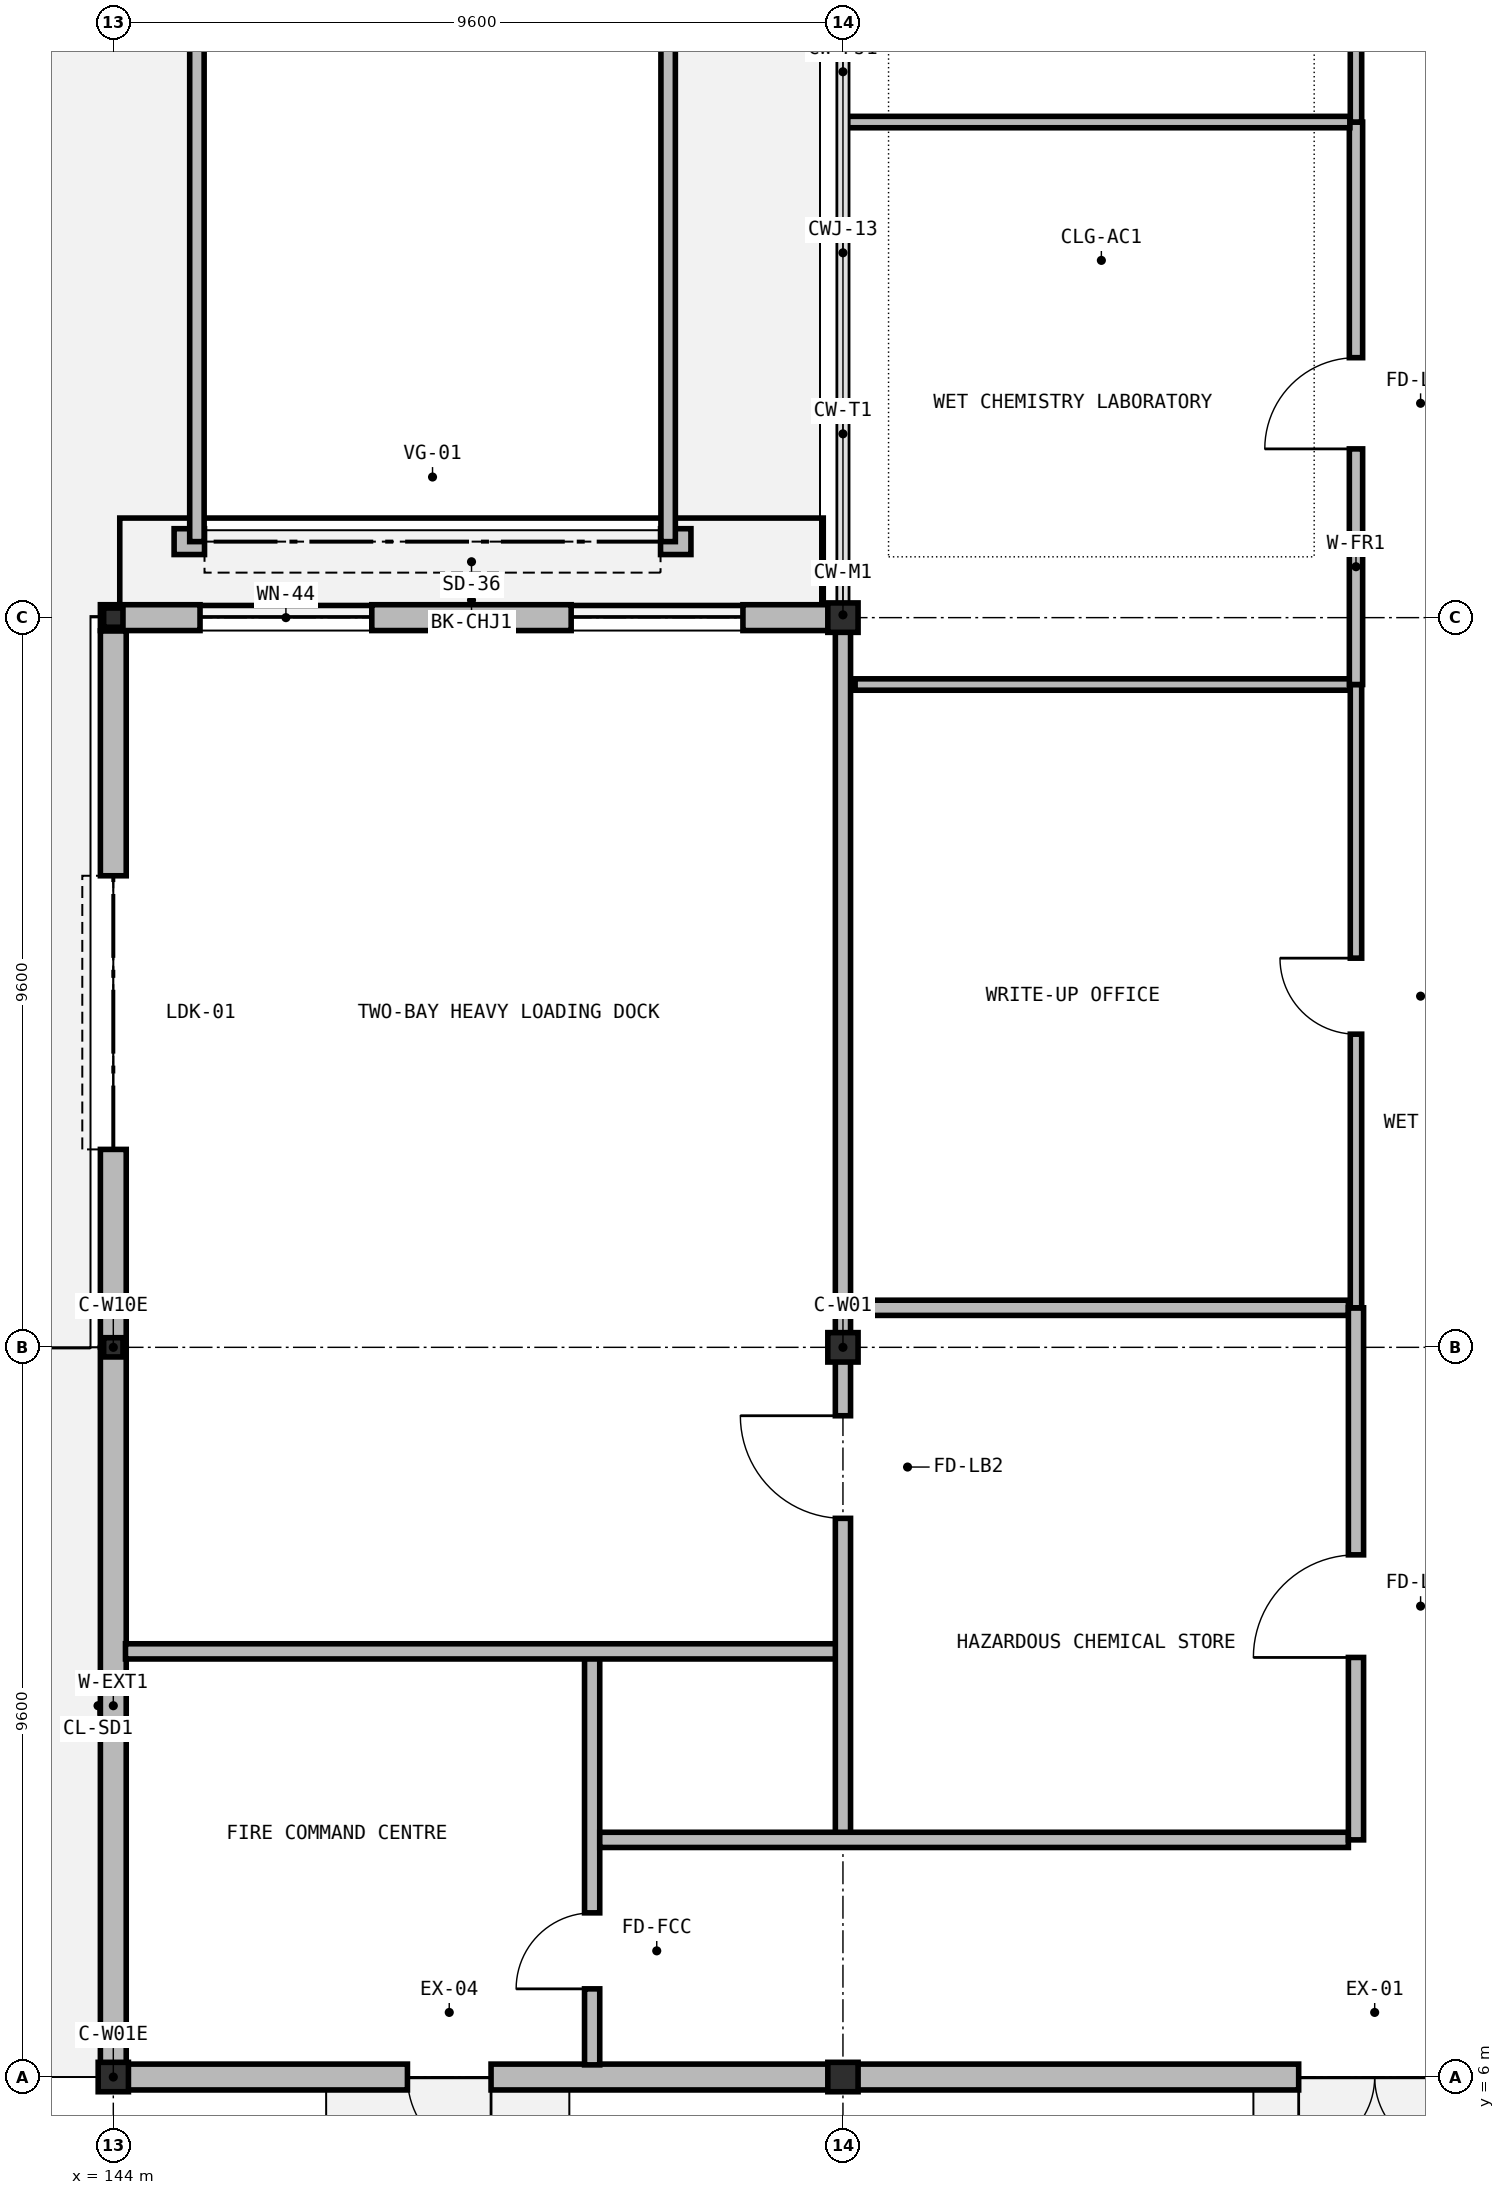
"""IFC4 building model, lengths in metres.
Left out: names, types, materials, properties, quantities, classifications, styles, units other than length and angle.
Written with IfcOpenShell. Run it as: python <this file> out.ifc"""

import sys

from ifc_helpers import new_model, si_unit, direction, frame, frame_2d, origin, origin_2d, place, context, subcontext, project, spatial, rectangle, i_section, extrude, element, fill, save


model = new_model("IFC4")
c1 = context("Model", 3, precision=1e-05, world=origin(), true_north=direction((0.0, 1.0)))
c2 = subcontext(c1, "Body", "Model", "MODEL_VIEW")
j1 = project(units=[si_unit("LENGTHUNIT", "METRE"), si_unit("PLANEANGLEUNIT", "RADIAN")], contexts=[c1])
p1 = place(None, origin())
s1 = spatial("IfcSite", under=j1, at=p1, CompositionType="ELEMENT")
p2 = place(p1, origin())
s2 = spatial("IfcBuilding", under=s1, at=p2, CompositionType="ELEMENT")
p3 = place(p2, origin())
s3 = spatial("IfcBuildingStorey", under=s2, at=p3, CompositionType="ELEMENT", Elevation=0.0)
for number, where, z_axis, x_axis in (
    (1, (144.0, 15.6, 0.0), (0.0, 0.0, 1.0), (1.0, 0.0, 0.0)),
    (2, (144.0, 25.2, 0.0), (0.0, 0.0, 1.0), (1.0, 0.0, 0.0)),
):
    element("IfcColumn", number, at=place(p3, frame(where, z_axis=z_axis, x_axis=x_axis)), inside=s3, PredefinedType="COLUMN", context=c2, shape_type="SweptSolid", body=[
        extrude(i_section(OverallWidth=0.254, OverallDepth=0.253, WebThickness=0.009, FlangeThickness=0.014, at=origin_2d()), origin(), (0.0, 0.0, 1.0), 5.25),
    ])
for number, where, z_axis, x_axis in (
    (3, (144.0, 6.0, 0.0), (0.0, 0.0, 1.0), (1.0, 0.0, 0.0)),
    (4, (153.6, 6.0, 0.0), (0.0, 0.0, 1.0), (1.0, 0.0, 0.0)),
    (5, (153.6, 15.6, 0.0), (0.0, 0.0, 1.0), (1.0, 0.0, 0.0)),
    (6, (153.6, 25.2, 0.0), (0.0, 0.0, 1.0), (1.0, 0.0, 0.0)),
):
    element("IfcColumn", number, at=place(p3, frame(where, z_axis=z_axis, x_axis=x_axis)), inside=s3, PredefinedType="COLUMN", context=c2, shape_type="SweptSolid", body=[
        extrude(i_section(OverallWidth=0.398, OverallDepth=0.387, WebThickness=0.024, FlangeThickness=0.039, at=origin_2d()), origin(), (0.0, 0.0, 1.0), 5.25),
    ])
p4 = place(p3, frame((144.0, 6.174, 0.0), z_axis=(0.0, 0.0, 1.0), x_axis=(0.0, 1.0, 0.0)))
e7 = element("IfcWall", 7, at=p4, inside=s3, PredefinedType="SOLIDWALL", context=c2, shape_type="SweptSolid", body=[
    extrude(rectangle(XDim=9.422, YDim=0.34, at=frame_2d((4.711, 0.0))), origin(), (0.0, 0.0, 1.0), 4.537),
])
p5 = place(p3, frame((144.0, 15.604, 0.0), z_axis=(0.0, 0.0, 1.0), x_axis=(0.0, 1.0, 0.0)))
e8 = element("IfcWall", 8, at=p5, inside=s3, PredefinedType="SOLIDWALL", context=c2, shape_type="SweptSolid", body=[
    extrude(rectangle(XDim=9.422, YDim=0.34, at=frame_2d((4.711, 0.0))), origin(), (0.0, 0.0, 1.0), 4.537),
])
p6 = place(p5, frame((2.6, 0.0, 0.0)))
e9 = element("IfcOpeningElement", 9, at=p6, cuts=e8, PredefinedType="OPENING", context=c2, shape_type="SweptSolid", body=[
    extrude(rectangle(XDim=3.6, YDim=4.2, at=frame_2d((1.8, 2.1))), frame((0.0, 0.18, 0.0), z_axis=(0.0, -1.0, 0.0), x_axis=(1.0, 0.0, 0.0)), (0.0, 0.0, 1.0), 0.36),
])
p7 = place(p3, frame((143.83, 25.2, 0.0), z_axis=(0.0, 0.0, 1.0), x_axis=(1.0, 0.0, 0.0)))
e10 = element("IfcWall", 10, at=p7, inside=s3, PredefinedType="SOLIDWALL", context=c2, shape_type="SweptSolid", body=[
    extrude(rectangle(XDim=9.766, YDim=0.34, at=frame_2d((4.883, 0.0))), origin(), (0.0, 0.0, 1.0), 4.465),
])
p8 = place(p7, frame((1.311, 0.0, 0.95)))
e11 = element("IfcOpeningElement", 11, at=p8, cuts=e10, PredefinedType="OPENING", context=c2, shape_type="SweptSolid", body=[
    extrude(rectangle(XDim=2.26, YDim=1.52, at=frame_2d((1.13, 0.76))), frame((0.0, 0.18, 0.0), z_axis=(0.0, -1.0, 0.0), x_axis=(1.0, 0.0, 0.0)), (0.0, 0.0, 1.0), 0.36),
])
p9 = place(p7, frame((6.194, 0.0, 0.95)))
e12 = element("IfcOpeningElement", 12, at=p9, cuts=e10, PredefinedType="OPENING", context=c2, shape_type="SweptSolid", body=[
    extrude(rectangle(XDim=2.26, YDim=1.52, at=frame_2d((1.13, 0.76))), frame((0.0, 0.18, 0.0), z_axis=(0.0, -1.0, 0.0), x_axis=(1.0, 0.0, 0.0)), (0.0, 0.0, 1.0), 0.36),
])
p10 = place(p3, frame((153.77, 6.0, 0.0), z_axis=(0.0, 0.0, 1.0), x_axis=(-1.0, 0.0, 0.0)))
e13 = element("IfcWall", 13, at=p10, inside=s3, PredefinedType="SOLIDWALL", context=c2, shape_type="SweptSolid", body=[
    extrude(rectangle(XDim=9.94, YDim=0.34, at=frame_2d((4.97, 0.0))), origin(), (0.0, 0.0, 1.0), 4.537),
])
p11 = place(p10, frame((4.8, 0.0, 0.0)))
e14 = element("IfcOpeningElement", 14, at=p11, cuts=e13, PredefinedType="OPENING", context=c2, shape_type="SweptSolid", body=[
    extrude(rectangle(XDim=1.1, YDim=2.15, at=frame_2d((0.55, 1.075))), frame((0.0, 0.18, 0.0), z_axis=(0.0, -1.0, 0.0), x_axis=(1.0, 0.0, 0.0)), (0.0, 0.0, 1.0), 0.36),
])
p12 = place(p3, frame((163.196, 6.0, 0.0), z_axis=(0.0, 0.0, 1.0), x_axis=(-1.0, 0.0, 0.0)))
e15 = element("IfcWall", 15, at=p12, inside=s3, PredefinedType="SOLIDWALL", context=c2, shape_type="SweptSolid", body=[
    extrude(rectangle(XDim=9.766, YDim=0.34, at=frame_2d((4.883, 0.0))), origin(), (0.0, 0.0, 1.0), 4.584),
])
p13 = place(p12, frame((1.6, 0.0, 0.0)))
e16 = element("IfcOpeningElement", 16, at=p13, cuts=e15, PredefinedType="OPENING", context=c2, shape_type="SweptSolid", body=[
    extrude(rectangle(XDim=2.0, YDim=2.3, at=frame_2d((1.0, 1.15))), frame((0.0, 0.18, 0.0), z_axis=(0.0, -1.0, 0.0), x_axis=(1.0, 0.0, 0.0)), (0.0, 0.0, 1.0), 0.36),
])
p14 = place(p3, frame((151.6, 26.2, 0.0), z_axis=(0.0, 0.0, 1.0), x_axis=(-1.0, 0.0, 0.0)))
e17 = element("IfcWall", 17, at=p14, inside=s3, PredefinedType="SOLIDWALL", context=c2, shape_type="SweptSolid", body=[
    extrude(rectangle(XDim=6.8, YDim=0.34, at=frame_2d((3.4, 0.0))), origin(), (0.0, 0.0, 1.0), 5.05),
])
p15 = place(p14, frame((0.4, 0.0, 0.0)))
e18 = element("IfcOpeningElement", 18, at=p15, cuts=e17, PredefinedType="OPENING", context=c2, shape_type="SweptSolid", body=[
    extrude(rectangle(XDim=6.0, YDim=4.5, at=frame_2d((3.0, 2.25))), frame((0.0, 0.18, 0.0), z_axis=(0.0, -1.0, 0.0), x_axis=(1.0, 0.0, 0.0)), (0.0, 0.0, 1.0), 0.36),
])
for number, where, z_axis, x_axis in (
    (19, (145.1, 26.2, 0.0), (0.0, 0.0, 1.0), (0.0, 1.0, 0.0)),
    (20, (151.3, 56.1, 0.0), (0.0, 0.0, 1.0), (0.0, -1.0, 0.0)),
):
    element("IfcWall", number, at=place(p3, frame(where, z_axis=z_axis, x_axis=x_axis)), inside=s3, PredefinedType="PARAPET", context=c2, shape_type="SweptSolid", body=[
        extrude(rectangle(XDim=29.9, YDim=0.19, at=frame_2d((14.95, 0.0))), origin(), (0.0, 0.0, 1.0), 1.3),
    ])
p16 = place(p3, frame((150.3, 6.16, 0.0), z_axis=(0.0, 0.0, 1.0), x_axis=(0.0, 1.0, 0.0)))
e21 = element("IfcWall", 21, at=p16, inside=s3, PredefinedType="SOLIDWALL", context=c2, shape_type="SweptSolid", body=[
    extrude(rectangle(XDim=5.44, YDim=0.2, at=frame_2d((2.72, 0.0))), origin(), (0.0, 0.0, 1.0), 4.93),
])
p17 = place(p16, frame((1.0, 0.0, 0.0)))
e22 = element("IfcOpeningElement", 22, at=p17, cuts=e21, PredefinedType="OPENING", context=c2, shape_type="SweptSolid", body=[
    extrude(rectangle(XDim=1.0, YDim=2.15, at=frame_2d((0.5, 1.075))), frame((0.0, 0.11, 0.0), z_axis=(0.0, -1.0, 0.0), x_axis=(1.0, 0.0, 0.0)), (0.0, 0.0, 1.0), 0.22),
])
p18 = place(p3, frame((144.16, 11.6, 0.0), z_axis=(0.0, 0.0, 1.0), x_axis=(1.0, 0.0, 0.0)))
e23 = element("IfcWall", 23, at=p18, inside=s3, PredefinedType="SOLIDWALL", context=c2, shape_type="SweptSolid", body=[
    extrude(rectangle(XDim=9.49, YDim=0.2, at=frame_2d((4.745, 0.0))), origin(), (0.0, 0.0, 1.0), 4.93),
])
p19 = place(p3, frame((153.6, 9.15, 0.0), z_axis=(0.0, 0.0, 1.0), x_axis=(0.0, 1.0, 0.0)))
e24 = element("IfcWall", 24, at=p19, inside=s3, PredefinedType="SOLIDWALL", context=c2, shape_type="SweptSolid", body=[
    extrude(rectangle(XDim=15.89, YDim=0.2, at=frame_2d((7.945, 0.0))), origin(), (0.0, 0.0, 1.0), 4.551),
])
p20 = place(p19, frame((4.2, 0.0, 0.0)))
e25 = element("IfcOpeningElement", 25, at=p20, cuts=e24, PredefinedType="OPENING", context=c2, shape_type="SweptSolid", body=[
    extrude(rectangle(XDim=1.35, YDim=2.2, at=frame_2d((0.675, 1.1))), frame((0.0, 0.11, 0.0), z_axis=(0.0, -1.0, 0.0), x_axis=(1.0, 0.0, 0.0)), (0.0, 0.0, 1.0), 0.22),
])
p21 = place(p3, frame((150.4, 9.12, 0.0), z_axis=(0.0, 0.0, 1.0), x_axis=(1.0, 0.0, 0.0)))
e26 = element("IfcWall", 26, at=p21, inside=s3, PredefinedType="SOLIDWALL", context=c2, shape_type="SweptSolid", body=[
    extrude(rectangle(XDim=9.85, YDim=0.2, at=frame_2d((4.925, 0.0))), origin(), (0.0, 0.0, 1.0), 4.93),
])
p22 = place(p3, frame((153.76, 16.12, 0.0), z_axis=(0.0, 0.0, 1.0), x_axis=(1.0, 0.0, 0.0)))
e27 = element("IfcWall", 27, at=p22, inside=s3, PredefinedType="SOLIDWALL", context=c2, shape_type="SweptSolid", body=[
    extrude(rectangle(XDim=6.49, YDim=0.2, at=frame_2d((3.245, 0.0))), origin(), (0.0, 0.0, 1.0), 4.93),
])
p23 = place(p3, frame((160.35, 9.12, 0.0), z_axis=(0.0, 0.0, 1.0), x_axis=(0.0, 1.0, 0.0)))
e28 = element("IfcWall", 28, at=p23, inside=s3, PredefinedType="SOLIDWALL", context=c2, shape_type="SweptSolid", body=[
    extrude(rectangle(XDim=7.0, YDim=0.2, at=frame_2d((3.5, 0.0))), origin(), (0.0, 0.0, 1.0), 4.93),
])
p24 = place(p23, frame((2.4, 0.0, 0.0)))
e29 = element("IfcOpeningElement", 29, at=p24, cuts=e28, PredefinedType="OPENING", context=c2, shape_type="SweptSolid", body=[
    extrude(rectangle(XDim=1.35, YDim=2.2, at=frame_2d((0.675, 1.1))), frame((0.0, 0.11, 0.0), z_axis=(0.0, -1.0, 0.0), x_axis=(1.0, 0.0, 0.0)), (0.0, 0.0, 1.0), 0.22),
])
p25 = place(p3, frame((160.35, 16.12, 0.0), z_axis=(0.0, 0.0, 1.0), x_axis=(0.0, 1.0, 0.0)))
e30 = element("IfcWall", 30, at=p25, inside=s3, PredefinedType="PARTITIONING", context=c2, shape_type="SweptSolid", body=[
    extrude(rectangle(XDim=8.2, YDim=0.15, at=frame_2d((4.1, 0.0))), origin(), (0.0, 0.0, 1.0), 4.93),
])
p26 = place(p25, frame((3.6, 0.0, 0.0)))
e31 = element("IfcOpeningElement", 31, at=p26, cuts=e30, PredefinedType="OPENING", context=c2, shape_type="SweptSolid", body=[
    extrude(rectangle(XDim=1.0, YDim=2.2, at=frame_2d((0.5, 1.1))), frame((0.0, 0.085, 0.0), z_axis=(0.0, -1.0, 0.0), x_axis=(1.0, 0.0, 0.0)), (0.0, 0.0, 1.0), 0.17),
])
p27 = place(p3, frame((153.76, 24.32, 0.0), z_axis=(0.0, 0.0, 1.0), x_axis=(1.0, 0.0, 0.0)))
e32 = element("IfcWall", 32, at=p27, inside=s3, PredefinedType="PARTITIONING", context=c2, shape_type="SweptSolid", body=[
    extrude(rectangle(XDim=6.51, YDim=0.15, at=frame_2d((3.255, 0.0))), origin(), (0.0, 0.0, 1.0), 4.93),
])
p28 = place(p3, frame((160.35, 24.32, 0.0), z_axis=(0.0, 0.0, 1.0), x_axis=(0.0, 1.0, 0.0)))
e33 = element("IfcWall", 33, at=p28, inside=s3, PredefinedType="PARTITIONING", context=c2, shape_type="SweptSolid", body=[
    extrude(rectangle(XDim=7.4, YDim=0.175, at=frame_2d((3.7, 0.0))), origin(), (0.0, 0.0, 1.0), 4.93),
])
p29 = place(p28, frame((3.1, 0.0, 0.0)))
e34 = element("IfcOpeningElement", 34, at=p29, cuts=e33, PredefinedType="OPENING", context=c2, shape_type="SweptSolid", body=[
    extrude(rectangle(XDim=1.2, YDim=2.2, at=frame_2d((0.6, 1.1))), frame((0.0, 0.097, 0.0), z_axis=(0.0, -1.0, 0.0), x_axis=(1.0, 0.0, 0.0)), (0.0, 0.0, 1.0), 0.195),
])
p30 = place(p3, frame((153.66, 31.72, 0.0), z_axis=(0.0, 0.0, 1.0), x_axis=(1.0, 0.0, 0.0)))
e35 = element("IfcWall", 35, at=p30, inside=s3, PredefinedType="PARTITIONING", context=c2, shape_type="SweptSolid", body=[
    extrude(rectangle(XDim=6.61, YDim=0.15, at=frame_2d((3.305, 0.0))), origin(), (0.0, 0.0, 1.0), 4.93),
])
p31 = place(p3, frame((160.35, 31.72, 0.0), z_axis=(0.0, 0.0, 1.0), x_axis=(0.0, 1.0, 0.0)))
e36 = element("IfcWall", 36, at=p31, inside=s3, PredefinedType="PARTITIONING", context=c2, shape_type="SweptSolid", body=[
    extrude(rectangle(XDim=9.6, YDim=0.15, at=frame_2d((4.8, 0.0))), origin(), (0.0, 0.0, 1.0), 4.93),
])
p32 = place(p31, frame((4.3, 0.0, 0.0)))
e37 = element("IfcOpeningElement", 37, at=p32, cuts=e36, PredefinedType="OPENING", context=c2, shape_type="SweptSolid", body=[
    extrude(rectangle(XDim=1.0, YDim=2.2, at=frame_2d((0.5, 1.1))), frame((0.0, 0.085, 0.0), z_axis=(0.0, -1.0, 0.0), x_axis=(1.0, 0.0, 0.0)), (0.0, 0.0, 1.0), 0.17),
])
p33 = place(p6, origin())
e38 = element("IfcDoor", 38, at=p33, inside=s3, OperationType="ROLLINGUP", PredefinedType="GATE", context=c2, shape_type="SweptSolid", body=[
    extrude(rectangle(XDim=3.6, YDim=4.2, at=frame_2d((1.8, 2.1))), frame((0.0, 0.025, 0.0), z_axis=(0.0, -1.0, 0.0), x_axis=(1.0, 0.0, 0.0)), (0.0, 0.0, 1.0), 0.05),
])
fill(e9, e38)
p34 = place(p8, origin())
e39 = element("IfcWindow", 39, at=p34, inside=s3, PartitioningType="SINGLE_PANEL", PredefinedType="WINDOW", context=c2, shape_type="SweptSolid", body=[
    extrude(rectangle(XDim=2.26, YDim=1.52, at=frame_2d((1.13, 0.76))), frame((0.0, 0.03, 0.0), z_axis=(0.0, -1.0, 0.0), x_axis=(1.0, 0.0, 0.0)), (0.0, 0.0, 1.0), 0.06),
])
fill(e11, e39)
p35 = place(p9, origin())
e40 = element("IfcWindow", 40, at=p35, inside=s3, PartitioningType="SINGLE_PANEL", PredefinedType="WINDOW", context=c2, shape_type="SweptSolid", body=[
    extrude(rectangle(XDim=2.26, YDim=1.52, at=frame_2d((1.13, 0.76))), frame((0.0, 0.03, 0.0), z_axis=(0.0, -1.0, 0.0), x_axis=(1.0, 0.0, 0.0)), (0.0, 0.0, 1.0), 0.06),
])
fill(e12, e40)
p36 = place(p11, origin())
e41 = element("IfcDoor", 41, at=p36, inside=s3, OperationType="SINGLE_SWING_LEFT", PredefinedType="DOOR", context=c2, shape_type="SweptSolid", body=[
    extrude(rectangle(XDim=1.1, YDim=2.15, at=frame_2d((0.55, 1.075))), frame((0.0, 0.025, 0.0), z_axis=(0.0, -1.0, 0.0), x_axis=(1.0, 0.0, 0.0)), (0.0, 0.0, 1.0), 0.05),
])
fill(e14, e41)
p37 = place(p13, origin())
e42 = element("IfcDoor", 42, at=p37, inside=s3, OperationType="DOUBLE_DOOR_SINGLE_SWING", PredefinedType="DOOR", context=c2, shape_type="SweptSolid", body=[
    extrude(rectangle(XDim=2.0, YDim=2.3, at=frame_2d((1.0, 1.15))), frame((0.0, 0.025, 0.0), z_axis=(0.0, -1.0, 0.0), x_axis=(1.0, 0.0, 0.0)), (0.0, 0.0, 1.0), 0.05),
])
fill(e16, e42)
p38 = place(p15, origin())
e43 = element("IfcDoor", 43, at=p38, inside=s3, OperationType="ROLLINGUP", PredefinedType="GATE", context=c2, shape_type="SweptSolid", body=[
    extrude(rectangle(XDim=6.0, YDim=4.5, at=frame_2d((3.0, 2.25))), frame((0.0, 0.025, 0.0), z_axis=(0.0, -1.0, 0.0), x_axis=(1.0, 0.0, 0.0)), (0.0, 0.0, 1.0), 0.05),
])
fill(e18, e43)
p39 = place(p17, origin())
e44 = element("IfcDoor", 44, at=p39, inside=s3, OperationType="SINGLE_SWING_LEFT", PredefinedType="DOOR", context=c2, shape_type="SweptSolid", body=[
    extrude(rectangle(XDim=1.0, YDim=2.15, at=frame_2d((0.5, 1.075))), frame((0.0, 0.025, 0.0), z_axis=(0.0, -1.0, 0.0), x_axis=(1.0, 0.0, 0.0)), (0.0, 0.0, 1.0), 0.05),
])
fill(e22, e44)
p40 = place(p20, origin())
e45 = element("IfcDoor", 45, at=p40, inside=s3, OperationType="SINGLE_SWING_RIGHT", PredefinedType="DOOR", context=c2, shape_type="SweptSolid", body=[
    extrude(rectangle(XDim=1.35, YDim=2.2, at=frame_2d((0.675, 1.1))), frame((0.0, 0.025, 0.0), z_axis=(0.0, -1.0, 0.0), x_axis=(1.0, 0.0, 0.0)), (0.0, 0.0, 1.0), 0.05),
])
fill(e25, e45)
p41 = place(p24, origin())
e46 = element("IfcDoor", 46, at=p41, inside=s3, OperationType="SINGLE_SWING_LEFT", PredefinedType="DOOR", context=c2, shape_type="SweptSolid", body=[
    extrude(rectangle(XDim=1.35, YDim=2.2, at=frame_2d((0.675, 1.1))), frame((0.0, 0.025, 0.0), z_axis=(0.0, -1.0, 0.0), x_axis=(1.0, 0.0, 0.0)), (0.0, 0.0, 1.0), 0.05),
])
fill(e29, e46)
p42 = place(p26, origin())
e47 = element("IfcDoor", 47, at=p42, inside=s3, OperationType="SINGLE_SWING_RIGHT", PredefinedType="DOOR", context=c2, shape_type="SweptSolid", body=[
    extrude(rectangle(XDim=1.0, YDim=2.2, at=frame_2d((0.5, 1.1))), frame((0.0, 0.025, 0.0), z_axis=(0.0, -1.0, 0.0), x_axis=(1.0, 0.0, 0.0)), (0.0, 0.0, 1.0), 0.05),
])
fill(e31, e47)
p43 = place(p29, origin())
e48 = element("IfcDoor", 48, at=p43, inside=s3, OperationType="SINGLE_SWING_LEFT", PredefinedType="DOOR", context=c2, shape_type="SweptSolid", body=[
    extrude(rectangle(XDim=1.2, YDim=2.2, at=frame_2d((0.6, 1.1))), frame((0.0, 0.025, 0.0), z_axis=(0.0, -1.0, 0.0), x_axis=(1.0, 0.0, 0.0)), (0.0, 0.0, 1.0), 0.05),
])
fill(e34, e48)
save(model, sys.argv[1])
